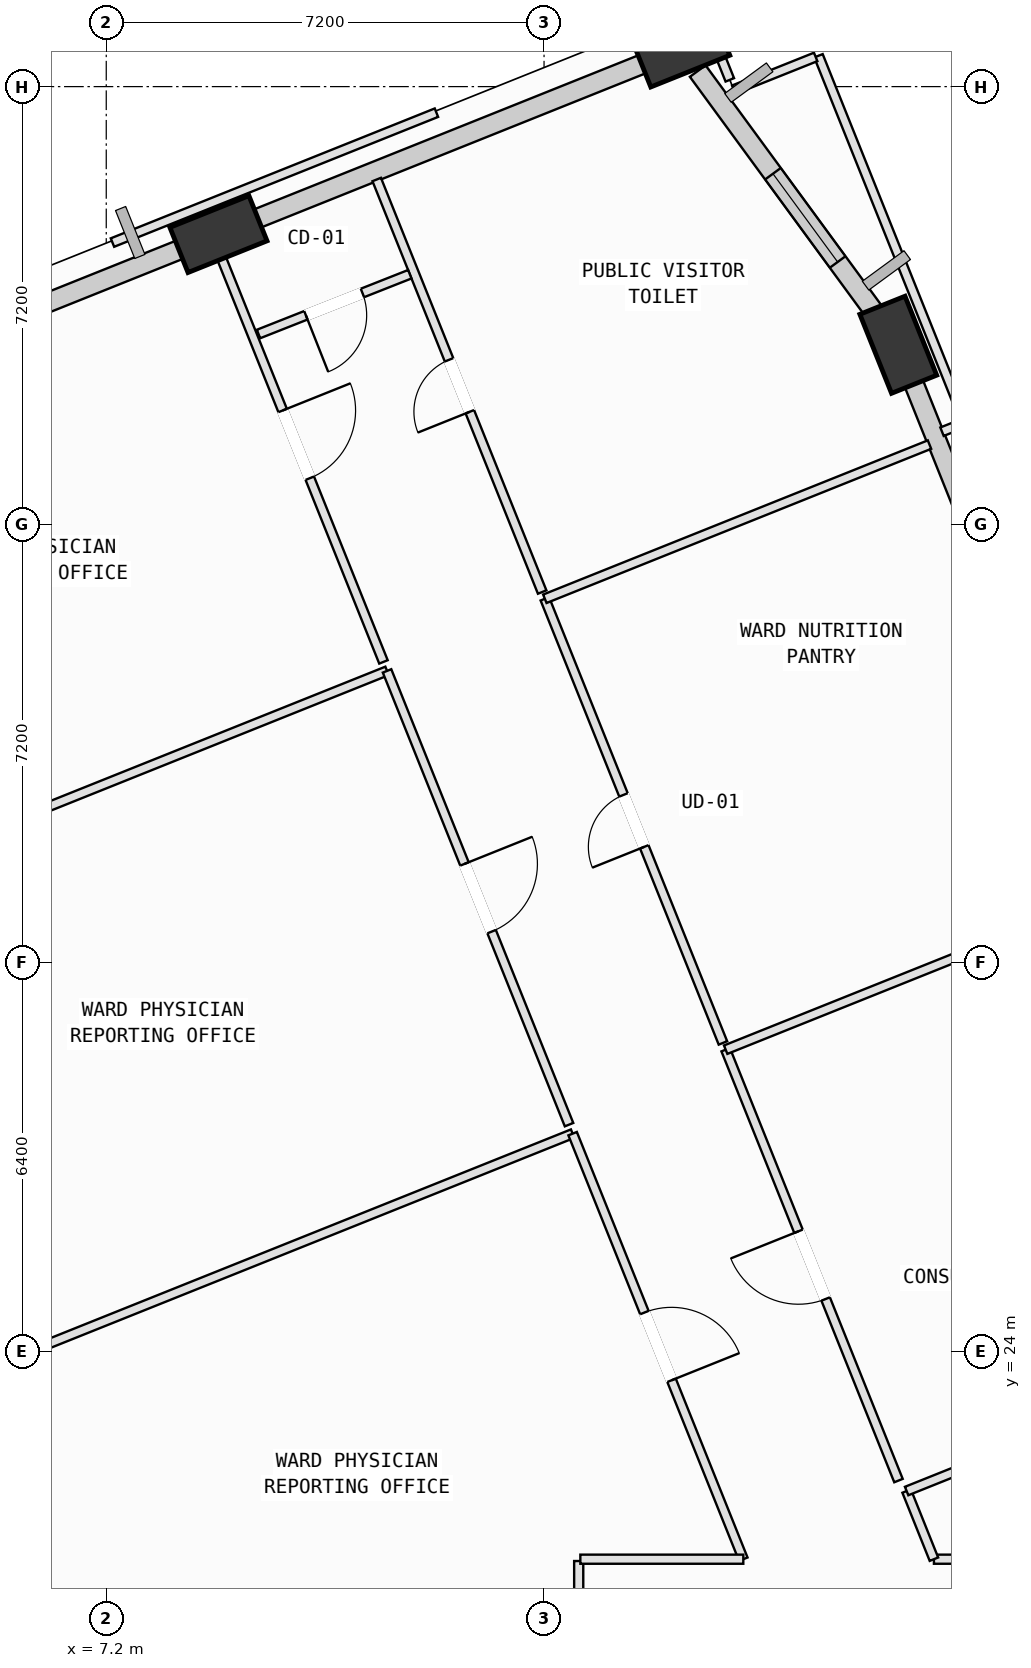
"""IFC4 building model, lengths in metres.
Left out: names, types, materials, properties, quantities, classifications, styles, units other than length and angle.
Written with IfcOpenShell. Run it as: python <this file> out.ifc"""

import sys

from ifc_helpers import new_model, si_unit, direction, frame, frame_2d, origin, origin_2d, place, context, subcontext, project, spatial, rectangle, extrude, element, fill, save


model = new_model("IFC4")
c1 = context("Model", 3, precision=1e-05, world=origin(), true_north=direction((0.0, 1.0)))
c2 = subcontext(c1, "Body", "Model", "MODEL_VIEW")
j1 = project(units=[si_unit("LENGTHUNIT", "METRE"), si_unit("PLANEANGLEUNIT", "RADIAN")], contexts=[c1])
p1 = place(None, origin())
s1 = spatial("IfcSite", under=j1, at=p1, CompositionType="ELEMENT")
p2 = place(p1, origin())
s2 = spatial("IfcBuilding", under=s1, at=p2, CompositionType="ELEMENT")
p3 = place(p2, frame((0.0, 0.0, 116.4)))
s3 = spatial("IfcBuildingStorey", under=s2, at=p3, CompositionType="ELEMENT", Elevation=116.4)
p4 = place(p3, frame((20.226, 40.554, 0.002), z_axis=(-0.06464168981, -0.055815847039, 0.996346346989), x_axis=(0.456711371128, 0.886076237962, 0.079269313113)))
e1 = element("IfcColumn", 1, at=p4, inside=s3, PredefinedType="COLUMN", context=c2, shape_type="SweptSolid", body=[
    extrude(rectangle(XDim=1.4, YDim=0.8, at=origin_2d()), origin(), (0.0, 0.0, 1.0), 4.011),
])
p5 = place(p3, frame((16.656, 45.426, 0.002), z_axis=(-0.084401583793, -0.070496574665, 0.993934910149), x_axis=(0.878913471383, -0.475222028152, 0.040928398225)))
e2 = element("IfcColumn", 2, at=p5, inside=s3, PredefinedType="COLUMN", context=c2, shape_type="SweptSolid", body=[
    extrude(rectangle(XDim=1.4, YDim=0.8, at=origin_2d()), origin(), (0.0, 0.0, 1.0), 4.021),
])
p6 = place(p3, frame((9.045, 42.374, 0.002), z_axis=(-0.071468567795, -0.101595690945, 0.992255289428), x_axis=(0.971621225937, -0.231980521435, 0.04623019558)))
e3 = element("IfcColumn", 3, at=p6, inside=s3, PredefinedType="COLUMN", context=c2, shape_type="SweptSolid", body=[
    extrude(rectangle(XDim=1.4, YDim=0.8, at=origin_2d()), origin(), (0.0, 0.0, 1.0), 4.028),
])
p7 = place(p3, frame((20.421, 40.067, 0.0), z_axis=(0.0, 0.0, 1.0), x_axis=(0.372174504676, -0.928162775632, 0.0)))
e4 = element("IfcWall", 4, at=p7, inside=s3, PredefinedType="SOLIDWALL", context=c2, shape_type="SweptSolid", body=[
    extrude(rectangle(XDim=5.047, YDim=0.32, at=frame_2d((2.523, 0.0))), origin(), (0.0, 0.0, 1.0), 3.165),
])
p8 = place(p7, frame((2.521, 0.0, 0.75)))
e5 = element("IfcOpeningElement", 5, at=p8, cuts=e4, PredefinedType="OPENING", context=c2, shape_type="SweptSolid", body=[
    extrude(rectangle(XDim=1.4, YDim=1.85, at=frame_2d((0.7, 0.925))), frame((0.0, 0.17, 0.0), z_axis=(0.0, -1.0, 0.0), x_axis=(1.0, 0.0, 0.0)), (0.0, 0.0, 1.0), 0.34),
])
p9 = place(p3, frame((16.927, 45.056, 0.0), z_axis=(0.0, 0.0, 1.0), x_axis=(0.591043738805, -0.80663950983, 0.0)))
e6 = element("IfcWall", 6, at=p9, inside=s3, PredefinedType="SOLIDWALL", context=c2, shape_type="SweptSolid", body=[
    extrude(rectangle(XDim=5.129, YDim=0.32, at=frame_2d((2.564, 0.0))), origin(), (0.0, 0.0, 1.0), 3.165),
])
p10 = place(p9, frame((2.094, 0.0, 0.75)))
e7 = element("IfcOpeningElement", 7, at=p10, cuts=e6, PredefinedType="OPENING", context=c2, shape_type="SweptSolid", body=[
    extrude(rectangle(XDim=1.8, YDim=2.05, at=frame_2d((0.9, 1.025))), frame((0.0, 0.17, 0.0), z_axis=(0.0, -1.0, 0.0), x_axis=(1.0, 0.0, 0.0)), (0.0, 0.0, 1.0), 0.34),
])
p11 = place(p3, frame((9.293, 42.473, 0.0), z_axis=(0.0, 0.0, 1.0), x_axis=(0.928173670316, 0.372147333366, 0.0)))
e8 = element("IfcWall", 8, at=p11, inside=s3, PredefinedType="SOLIDWALL", context=c2, shape_type="SweptSolid", body=[
    extrude(rectangle(XDim=7.231, YDim=0.32, at=frame_2d((3.615, 0.0))), origin(), (0.0, 0.0, 1.0), 3.165),
])
p12 = place(p3, frame((1.66, 39.412, 0.0), z_axis=(0.0, 0.0, 1.0), x_axis=(0.928159064782, 0.372183758999, 0.0)))
e9 = element("IfcWall", 9, at=p12, inside=s3, PredefinedType="SOLIDWALL", context=c2, shape_type="SweptSolid", body=[
    extrude(rectangle(XDim=7.27, YDim=0.32, at=frame_2d((3.635, 0.0))), origin(), (0.0, 0.0, 1.0), 3.165),
])
p13 = place(p3, frame((7.296, 16.643, 0.0), z_axis=(0.0, 0.0, 1.0), x_axis=(-0.372178527246, 0.928161162653, 0.0)))
e10 = element("IfcWall", 10, at=p13, inside=s3, PredefinedType="SOLIDWALL", context=c2, shape_type="SweptSolid", body=[
    extrude(rectangle(XDim=5.662, YDim=0.32, at=frame_2d((2.831, 0.0))), origin(), (0.0, 0.0, 1.0), 3.165),
])
p14 = place(p13, frame((2.23, 0.0, 0.75)))
e11 = element("IfcOpeningElement", 11, at=p14, cuts=e10, PredefinedType="OPENING", context=c2, shape_type="SweptSolid", body=[
    extrude(rectangle(XDim=1.2, YDim=1.75, at=frame_2d((0.6, 0.875))), frame((0.0, 0.17, 0.0), z_axis=(0.0, -1.0, 0.0), x_axis=(1.0, 0.0, 0.0)), (0.0, 0.0, 1.0), 0.34),
])
p15 = place(p3, frame((14.97, 20.55, 0.0), z_axis=(0.0, 0.0, 1.0), x_axis=(0.0, -1.0, 0.0)))
e12 = element("IfcWall", 12, at=p15, inside=s3, PredefinedType="PARTITIONING", context=c2, shape_type="SweptSolid", body=[
    extrude(rectangle(XDim=1.593, YDim=0.15, at=frame_2d((0.796, 0.0))), origin(), (0.0, 0.0, 1.0), 3.78),
])
p16 = place(p3, frame((4.693, 23.498, 0.0), z_axis=(0.0, 0.0, 1.0), x_axis=(0.928153869295, 0.372196715344, 0.0)))
e13 = element("IfcWall", 13, at=p16, inside=s3, PredefinedType="PARTITIONING", context=c2, shape_type="SweptSolid", body=[
    extrude(rectangle(XDim=10.965, YDim=0.15, at=frame_2d((5.482, 0.0))), origin(), (0.0, 0.0, 1.0), 3.78),
])
p17 = place(p3, frame((14.87, 27.579, 0.0), z_axis=(0.0, 0.0, 1.0), x_axis=(0.372222245283, -0.928143631189, 0.0)))
e14 = element("IfcWall", 14, at=p17, inside=s3, PredefinedType="PARTITIONING", context=c2, shape_type="SweptSolid", body=[
    extrude(rectangle(XDim=7.541, YDim=0.15, at=frame_2d((3.771, 0.0))), origin(), (0.0, 0.0, 1.0), 3.78),
])
p18 = place(p17, frame((3.17, 0.0, 0.0)))
e15 = element("IfcOpeningElement", 15, at=p18, cuts=e14, PredefinedType="OPENING", context=c2, shape_type="SweptSolid", body=[
    extrude(rectangle(XDim=1.2, YDim=2.15, at=frame_2d((0.6, 1.075))), frame((0.0, 0.085, 0.0), z_axis=(0.0, -1.0, 0.0), x_axis=(1.0, 0.0, 0.0)), (0.0, 0.0, 1.0), 0.17),
])
p19 = place(p3, frame((17.677, 20.58, 0.0), z_axis=(0.0, 0.0, 1.0), x_axis=(-1.0, 0.0, 0.0)))
e16 = element("IfcWall", 16, at=p19, inside=s3, PredefinedType="PARTITIONING", context=c2, shape_type="SweptSolid", body=[
    extrude(rectangle(XDim=2.68, YDim=0.15, at=frame_2d((1.34, 0.0))), origin(), (0.0, 0.0, 1.0), 3.78),
])
p20 = place(p3, frame((1.641, 31.109, 0.0), z_axis=(0.0, 0.0, 1.0), x_axis=(0.928153869295, 0.372196715344, 0.0)))
e17 = element("IfcWall", 17, at=p20, inside=s3, PredefinedType="PARTITIONING", context=c2, shape_type="SweptSolid", body=[
    extrude(rectangle(XDim=10.965, YDim=0.15, at=frame_2d((5.482, 0.0))), origin(), (0.0, 0.0, 1.0), 3.78),
])
p21 = place(p3, frame((11.818, 35.19, 0.0), z_axis=(0.0, 0.0, 1.0), x_axis=(0.372222898555, -0.928143369201, 0.0)))
e18 = element("IfcWall", 18, at=p21, inside=s3, PredefinedType="PARTITIONING", context=c2, shape_type="SweptSolid", body=[
    extrude(rectangle(XDim=8.041, YDim=0.15, at=frame_2d((4.021, 0.0))), origin(), (0.0, 0.0, 1.0), 3.78),
])
p22 = place(p21, frame((3.42, 0.0, 0.0)))
e19 = element("IfcOpeningElement", 19, at=p22, cuts=e18, PredefinedType="OPENING", context=c2, shape_type="SweptSolid", body=[
    extrude(rectangle(XDim=1.2, YDim=2.15, at=frame_2d((0.6, 1.075))), frame((0.0, 0.085, 0.0), z_axis=(0.0, -1.0, 0.0), x_axis=(1.0, 0.0, 0.0)), (0.0, 0.0, 1.0), 0.17),
])
p23 = place(p3, frame((8.345, 42.276, 0.0), z_axis=(0.0, 0.0, 1.0), x_axis=(0.9282178773, 0.372037057643, 0.0)))
e20 = element("IfcWall", 20, at=p23, inside=s3, PredefinedType="PARTITIONING", context=c2, shape_type="SweptSolid", body=[
    extrude(rectangle(XDim=0.586, YDim=0.15, at=frame_2d((0.293, 0.0))), origin(), (0.0, 0.0, 1.0), 3.78),
])
p24 = place(p3, frame((8.889, 42.494, 0.0), z_axis=(0.0, 0.0, 1.0), x_axis=(0.372253112899, -0.92813125146, 0.0)))
e21 = element("IfcWall", 21, at=p24, inside=s3, PredefinedType="PARTITIONING", context=c2, shape_type="SweptSolid", body=[
    extrude(rectangle(XDim=7.71, YDim=0.15, at=frame_2d((3.855, 0.0))), origin(), (0.0, 0.0, 1.0), 2.965),
])
p25 = place(p24, frame((3.255, 0.0, 0.0)))
e22 = element("IfcOpeningElement", 22, at=p25, cuts=e21, PredefinedType="OPENING", context=c2, shape_type="SweptSolid", body=[
    extrude(rectangle(XDim=1.2, YDim=2.15, at=frame_2d((0.6, 1.075))), frame((0.0, 0.085, 0.0), z_axis=(0.0, -1.0, 0.0), x_axis=(1.0, 0.0, 0.0)), (0.0, 0.0, 1.0), 0.17),
])
p26 = place(p3, frame((27.359, 20.58, 0.0), z_axis=(0.0, 0.0, 1.0), x_axis=(-1.0, 0.0, 0.0)))
e23 = element("IfcWall", 23, at=p26, inside=s3, PredefinedType="PARTITIONING", context=c2, shape_type="SweptSolid", body=[
    extrude(rectangle(XDim=6.547, YDim=0.15, at=frame_2d((3.273, 0.0))), origin(), (0.0, 0.0, 1.0), 3.78),
])
p27 = place(p26, frame((2.674, 0.0, 0.0)))
e24 = element("IfcOpeningElement", 24, at=p27, cuts=e23, PredefinedType="OPENING", context=c2, shape_type="SweptSolid", body=[
    extrude(rectangle(XDim=1.2, YDim=2.15, at=frame_2d((0.6, 1.075))), frame((0.0, 0.085, 0.0), z_axis=(0.0, -1.0, 0.0), x_axis=(1.0, 0.0, 0.0)), (0.0, 0.0, 1.0), 0.17),
])
p28 = place(p3, frame((20.812, 20.58, 0.0), z_axis=(0.0, 0.0, 1.0), x_axis=(-0.371843836614, 0.928295298476, 0.0)))
e25 = element("IfcWall", 25, at=p28, inside=s3, PredefinedType="PARTITIONING", context=c2, shape_type="SweptSolid", body=[
    extrude(rectangle(XDim=1.208, YDim=0.15, at=frame_2d((0.604, 0.0))), origin(), (0.0, 0.0, 1.0), 3.78),
])
p29 = place(p3, frame((20.363, 21.701, 0.0), z_axis=(0.0, 0.0, 1.0), x_axis=(0.928142281739, 0.372225610147, 0.0)))
e26 = element("IfcWall", 26, at=p29, inside=s3, PredefinedType="PARTITIONING", context=c2, shape_type="SweptSolid", body=[
    extrude(rectangle(XDim=6.754, YDim=0.15, at=frame_2d((3.377, 0.0))), origin(), (0.0, 0.0, 1.0), 3.78),
])
p30 = place(p3, frame((20.229, 21.873, 0.0), z_axis=(0.0, 0.0, 1.0), x_axis=(-0.372211937798, 0.928147764831, 0.0)))
e27 = element("IfcWall", 27, at=p30, inside=s3, PredefinedType="PARTITIONING", context=c2, shape_type="SweptSolid", body=[
    extrude(rectangle(XDim=7.635, YDim=0.15, at=frame_2d((3.818, 0.0))), origin(), (0.0, 0.0, 1.0), 3.78),
])
p31 = place(p30, frame((3.218, 0.0, 0.0)))
e28 = element("IfcOpeningElement", 28, at=p31, cuts=e27, PredefinedType="OPENING", context=c2, shape_type="SweptSolid", body=[
    extrude(rectangle(XDim=1.2, YDim=2.15, at=frame_2d((0.6, 1.075))), frame((0.0, 0.085, 0.0), z_axis=(0.0, -1.0, 0.0), x_axis=(1.0, 0.0, 0.0)), (0.0, 0.0, 1.0), 0.17),
])
p32 = place(p3, frame((17.387, 28.96, 0.0), z_axis=(0.0, 0.0, 1.0), x_axis=(0.928184887564, 0.372119355178, 0.0)))
e29 = element("IfcWall", 29, at=p32, inside=s3, PredefinedType="PARTITIONING", context=c2, shape_type="SweptSolid", body=[
    extrude(rectangle(XDim=6.815, YDim=0.15, at=frame_2d((3.408, 0.0))), origin(), (0.0, 0.0, 1.0), 3.78),
])
p33 = place(p3, frame((17.342, 29.071, 0.0), z_axis=(0.0, 0.0, 1.0), x_axis=(-0.372155371127, 0.928170447569, 0.0)))
e30 = element("IfcWall", 30, at=p33, inside=s3, PredefinedType="PARTITIONING", context=c2, shape_type="SweptSolid", body=[
    extrude(rectangle(XDim=7.87, YDim=0.15, at=frame_2d((3.935, 0.0))), origin(), (0.0, 0.0, 1.0), 3.78),
])
p34 = place(p33, frame((3.475, 0.0, 0.0)))
e31 = element("IfcOpeningElement", 31, at=p34, cuts=e30, PredefinedType="OPENING", context=c2, shape_type="SweptSolid", body=[
    extrude(rectangle(XDim=0.92, YDim=2.1, at=frame_2d((0.46, 1.05))), frame((0.0, 0.085, 0.0), z_axis=(0.0, -1.0, 0.0), x_axis=(1.0, 0.0, 0.0)), (0.0, 0.0, 1.0), 0.17),
])
p35 = place(p3, frame((14.413, 36.376, 0.0), z_axis=(0.0, 0.0, 1.0), x_axis=(0.928184887564, 0.372119355178, 0.0)))
e32 = element("IfcWall", 32, at=p35, inside=s3, PredefinedType="PARTITIONING", context=c2, shape_type="SweptSolid", body=[
    extrude(rectangle(XDim=6.815, YDim=0.15, at=frame_2d((3.408, 0.0))), origin(), (0.0, 0.0, 1.0), 3.78),
])
p36 = place(p3, frame((18.913, 45.307, 0.0), z_axis=(0.0, 0.0, 1.0), x_axis=(0.372116390733, -0.928186076036, 0.0)))
e33 = element("IfcWall", 33, at=p36, inside=s3, PredefinedType="PARTITIONING", context=c2, shape_type="SweptSolid", body=[
    extrude(rectangle(XDim=6.495, YDim=0.15, at=frame_2d((3.248, 0.0))), origin(), (0.0, 0.0, 1.0), 3.78),
])
p37 = place(p3, frame((21.284, 39.259, 0.0), z_axis=(0.0, 0.0, 1.0), x_axis=(-0.928983565378, -0.370120973814, 0.0)))
e34 = element("IfcWall", 34, at=p37, inside=s3, PredefinedType="PARTITIONING", context=c2, shape_type="SweptSolid", body=[
    extrude(rectangle(XDim=0.365, YDim=0.15, at=frame_2d((0.182, 0.0))), origin(), (0.0, 0.0, 1.0), 3.78),
])
p38 = place(p3, frame((14.369, 36.487, 0.0), z_axis=(0.0, 0.0, 1.0), x_axis=(-0.372213948796, 0.928146958365, 0.0)))
e35 = element("IfcWall", 35, at=p38, inside=s3, PredefinedType="PARTITIONING", context=c2, shape_type="SweptSolid", body=[
    extrude(rectangle(XDim=7.31, YDim=0.15, at=frame_2d((3.655, 0.0))), origin(), (0.0, 0.0, 1.0), 3.78),
])
p39 = place(p38, frame((3.195, 0.0, 0.0)))
e36 = element("IfcOpeningElement", 36, at=p39, cuts=e35, PredefinedType="OPENING", context=c2, shape_type="SweptSolid", body=[
    extrude(rectangle(XDim=0.92, YDim=2.1, at=frame_2d((0.46, 1.05))), frame((0.0, 0.085, 0.0), z_axis=(0.0, -1.0, 0.0), x_axis=(1.0, 0.0, 0.0)), (0.0, 0.0, 1.0), 0.17),
])
p40 = place(p3, frame((15.934, 45.341, 0.0), z_axis=(0.0, 0.0, 1.0), x_axis=(0.928180478143, 0.372130353498, 0.0)))
e37 = element("IfcWall", 37, at=p40, inside=s3, PredefinedType="PARTITIONING", context=c2, shape_type="SweptSolid", body=[
    extrude(rectangle(XDim=1.252, YDim=0.15, at=frame_2d((0.626, 0.0))), origin(), (0.0, 0.0, 1.0), 3.165),
])
p41 = place(p3, frame((17.115, 45.761, 0.0), z_axis=(0.0, 0.0, 1.0), x_axis=(0.371436649195, -0.928458300429, 0.0)))
e38 = element("IfcWall", 38, at=p41, inside=s3, PredefinedType="PARTITIONING", context=c2, shape_type="SweptSolid", body=[
    extrude(rectangle(XDim=0.916, YDim=0.15, at=frame_2d((0.458, 0.0))), origin(), (0.0, 0.0, 1.0), 3.78),
])
p42 = place(p3, frame((17.52, 44.749, 0.0), z_axis=(0.0, 0.0, 1.0), x_axis=(0.928407040991, 0.371564753763, 0.0)))
e39 = element("IfcWall", 39, at=p42, inside=s3, PredefinedType="PARTITIONING", context=c2, shape_type="SweptSolid", body=[
    extrude(rectangle(XDim=1.451, YDim=0.15, at=frame_2d((0.725, 0.0))), origin(), (0.0, 0.0, 1.0), 3.78),
])
p43 = place(p3, frame((12.192, 41.714, 0.0), z_axis=(0.0, 0.0, 1.0), x_axis=(-0.930010784607, -0.36753223058, 0.0)))
e40 = element("IfcWall", 40, at=p43, inside=s3, PredefinedType="PARTITIONING", context=c2, shape_type="SweptSolid", body=[
    extrude(rectangle(XDim=2.675, YDim=0.15, at=frame_2d((1.337, 0.0))), origin(), (0.0, 0.0, 1.0), 3.78),
])
p44 = place(p43, frame((0.838, 0.0, 0.0)))
e41 = element("IfcOpeningElement", 41, at=p44, cuts=e40, PredefinedType="OPENING", context=c2, shape_type="SweptSolid", body=[
    extrude(rectangle(XDim=1.0, YDim=2.12, at=frame_2d((0.5, 1.06))), frame((0.0, 0.085, 0.0), z_axis=(0.0, -1.0, 0.0), x_axis=(1.0, 0.0, 0.0)), (0.0, 0.0, 1.0), 0.17),
])
p45 = place(p3, frame((7.302, 42.235, 0.0), z_axis=(0.0, 0.0, 1.0), x_axis=(0.928186012977, 0.372116548024, 0.0)))
e42 = element("IfcWall", 42, at=p45, inside=s3, PredefinedType="PARTITIONING", context=c2, shape_type="SweptSolid", body=[
    extrude(rectangle(XDim=5.74, YDim=0.15, at=frame_2d((2.87, 0.0))), origin(), (0.0, 0.0, 1.0), 3.78),
])
p46 = place(p10, origin())
e43 = element("IfcWindow", 43, at=p46, inside=s3, PartitioningType="SINGLE_PANEL", PredefinedType="WINDOW", context=c2, shape_type="SweptSolid", body=[
    extrude(rectangle(XDim=1.8, YDim=2.05, at=frame_2d((0.9, 1.025))), frame((0.0, 0.03, 0.0), z_axis=(0.0, -1.0, 0.0), x_axis=(1.0, 0.0, 0.0)), (0.0, 0.0, 1.0), 0.06),
])
fill(e7, e43)
p47 = place(p18, origin())
e44 = element("IfcDoor", 44, at=p47, inside=s3, OperationType="SINGLE_SWING_RIGHT", PredefinedType="DOOR", context=c2, shape_type="SweptSolid", body=[
    extrude(rectangle(XDim=1.2, YDim=2.15, at=frame_2d((0.6, 1.075))), frame((0.0, 0.025, 0.0), z_axis=(0.0, -1.0, 0.0), x_axis=(1.0, 0.0, 0.0)), (0.0, 0.0, 1.0), 0.05),
])
fill(e15, e44)
p48 = place(p22, origin())
e45 = element("IfcDoor", 45, at=p48, inside=s3, OperationType="SINGLE_SWING_LEFT", PredefinedType="DOOR", context=c2, shape_type="SweptSolid", body=[
    extrude(rectangle(XDim=1.2, YDim=2.15, at=frame_2d((0.6, 1.075))), frame((0.0, 0.025, 0.0), z_axis=(0.0, -1.0, 0.0), x_axis=(1.0, 0.0, 0.0)), (0.0, 0.0, 1.0), 0.05),
])
fill(e19, e45)
p49 = place(p25, origin())
e46 = element("IfcDoor", 46, at=p49, inside=s3, OperationType="SINGLE_SWING_LEFT", PredefinedType="DOOR", context=c2, shape_type="SweptSolid", body=[
    extrude(rectangle(XDim=1.2, YDim=2.15, at=frame_2d((0.6, 1.075))), frame((0.0, 0.025, 0.0), z_axis=(0.0, -1.0, 0.0), x_axis=(1.0, 0.0, 0.0)), (0.0, 0.0, 1.0), 0.05),
])
fill(e22, e46)
p50 = place(p31, origin())
e47 = element("IfcDoor", 47, at=p50, inside=s3, OperationType="SINGLE_SWING_RIGHT", PredefinedType="DOOR", context=c2, shape_type="SweptSolid", body=[
    extrude(rectangle(XDim=1.2, YDim=2.15, at=frame_2d((0.6, 1.075))), frame((0.0, 0.025, 0.0), z_axis=(0.0, -1.0, 0.0), x_axis=(1.0, 0.0, 0.0)), (0.0, 0.0, 1.0), 0.05),
])
fill(e28, e47)
p51 = place(p34, origin())
e48 = element("IfcDoor", 48, at=p51, inside=s3, OperationType="SINGLE_SWING_LEFT", PredefinedType="DOOR", context=c2, shape_type="SweptSolid", body=[
    extrude(rectangle(XDim=0.92, YDim=2.1, at=frame_2d((0.46, 1.05))), frame((0.0, 0.025, 0.0), z_axis=(0.0, -1.0, 0.0), x_axis=(1.0, 0.0, 0.0)), (0.0, 0.0, 1.0), 0.05),
])
fill(e31, e48)
p52 = place(p39, origin())
e49 = element("IfcDoor", 49, at=p52, inside=s3, OperationType="SINGLE_SWING_LEFT", PredefinedType="DOOR", context=c2, shape_type="SweptSolid", body=[
    extrude(rectangle(XDim=0.92, YDim=2.1, at=frame_2d((0.46, 1.05))), frame((0.0, 0.025, 0.0), z_axis=(0.0, -1.0, 0.0), x_axis=(1.0, 0.0, 0.0)), (0.0, 0.0, 1.0), 0.05),
])
fill(e36, e49)
p53 = place(p44, origin())
e50 = element("IfcDoor", 50, at=p53, inside=s3, OperationType="SINGLE_SWING_RIGHT", PredefinedType="DOOR", context=c2, shape_type="SweptSolid", body=[
    extrude(rectangle(XDim=1.0, YDim=2.12, at=frame_2d((0.5, 1.06))), frame((0.0, 0.025, 0.0), z_axis=(0.0, -1.0, 0.0), x_axis=(1.0, 0.0, 0.0)), (0.0, 0.0, 1.0), 0.05),
])
fill(e41, e50)
save(model, sys.argv[1])
